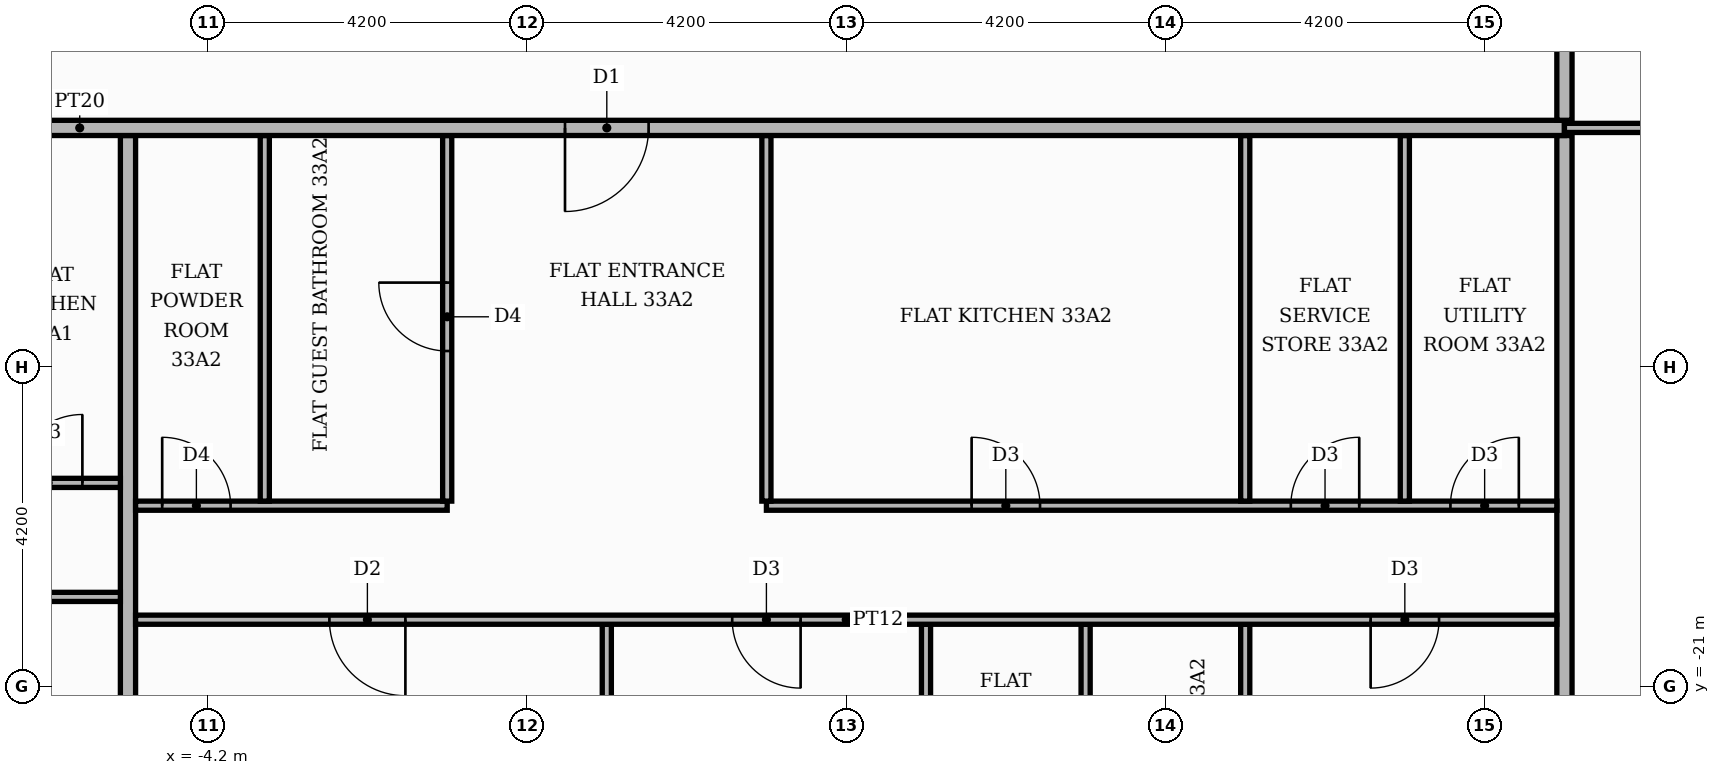
"""IFC4 building model, lengths in metres.
Left out: names, types, materials, properties, quantities, classifications, styles, units other than length and angle.
Written with IfcOpenShell. Run it as: python <this file> out.ifc"""

import sys

from ifc_helpers import new_model, si_unit, direction, frame, frame_2d, origin, place, context, subcontext, project, spatial, rectangle, extrude, element, fill, save


model = new_model("IFC4")
c1 = context("Model", 3, precision=1e-05, world=origin(), true_north=direction((0.0, 1.0)))
c2 = subcontext(c1, "Body", "Model", "MODEL_VIEW")
j1 = project(units=[si_unit("LENGTHUNIT", "METRE"), si_unit("PLANEANGLEUNIT", "RADIAN")], contexts=[c1])
p1 = place(None, origin())
s1 = spatial("IfcSite", under=j1, at=p1, CompositionType="ELEMENT")
p2 = place(p1, origin())
s2 = spatial("IfcBuilding", under=s1, at=p2, CompositionType="ELEMENT")
p3 = place(p2, frame((0.0, 0.0, 141.6)))
s3 = spatial("IfcBuildingStorey", under=s2, at=p3, CompositionType="ELEMENT", Elevation=141.6)
p4 = place(p3, frame((-5.25, -25.42, 0.0), z_axis=(0.0, 0.0, 1.0), x_axis=(0.0, 1.0, 0.0)))
e1 = element("IfcWall", 1, at=p4, inside=s3, PredefinedType="PARTITIONING", context=c2, shape_type="SweptSolid", body=[
    extrude(rectangle(XDim=11.67, YDim=0.2, at=frame_2d((5.835, 0.0))), origin(), (0.0, 0.0, 1.0), 3.48),
])
p5 = place(p3, frame((1.05, -25.42, 0.0), z_axis=(0.0, 0.0, 1.0), x_axis=(0.0, 1.0, 0.0)))
e2 = element("IfcWall", 2, at=p5, inside=s3, PredefinedType="PARTITIONING", context=c2, shape_type="SweptSolid", body=[
    extrude(rectangle(XDim=5.24, YDim=0.12, at=frame_2d((2.62, 0.0))), origin(), (0.0, 0.0, 1.0), 3.48),
])
p6 = place(p3, frame((5.25, -25.42, 0.0), z_axis=(0.0, 0.0, 1.0), x_axis=(0.0, 1.0, 0.0)))
e3 = element("IfcWall", 3, at=p6, inside=s3, PredefinedType="PARTITIONING", context=c2, shape_type="SweptSolid", body=[
    extrude(rectangle(XDim=5.24, YDim=0.12, at=frame_2d((2.62, 0.0))), origin(), (0.0, 0.0, 1.0), 3.48),
])
p7 = place(p6, frame((2.05, 0.0, 0.0)))
e4 = element("IfcOpeningElement", 4, at=p7, cuts=e3, PredefinedType="OPENING", context=c2, shape_type="SweptSolid", body=[
    extrude(rectangle(XDim=0.9, YDim=2.1, at=frame_2d((0.45, 1.05))), frame((0.0, 0.07, 0.0), z_axis=(0.0, -1.0, 0.0), x_axis=(1.0, 0.0, 0.0)), (0.0, 0.0, 1.0), 0.14),
])
p8 = place(p3, frame((7.35, -25.42, 0.0), z_axis=(0.0, 0.0, 1.0), x_axis=(0.0, 1.0, 0.0)))
e5 = element("IfcWall", 5, at=p8, inside=s3, PredefinedType="PARTITIONING", context=c2, shape_type="SweptSolid", body=[
    extrude(rectangle(XDim=5.24, YDim=0.12, at=frame_2d((2.62, 0.0))), origin(), (0.0, 0.0, 1.0), 3.48),
])
p9 = place(p8, frame((2.05, 0.0, 0.0)))
e6 = element("IfcOpeningElement", 6, at=p9, cuts=e5, PredefinedType="OPENING", context=c2, shape_type="SweptSolid", body=[
    extrude(rectangle(XDim=0.9, YDim=2.1, at=frame_2d((0.45, 1.05))), frame((0.0, 0.07, 0.0), z_axis=(0.0, -1.0, 0.0), x_axis=(1.0, 0.0, 0.0)), (0.0, 0.0, 1.0), 0.14),
])
p10 = place(p3, frame((9.45, -25.42, 0.0), z_axis=(0.0, 0.0, 1.0), x_axis=(0.0, 1.0, 0.0)))
e7 = element("IfcWall", 7, at=p10, inside=s3, PredefinedType="PARTITIONING", context=c2, shape_type="SweptSolid", body=[
    extrude(rectangle(XDim=5.24, YDim=0.12, at=frame_2d((2.62, 0.0))), origin(), (0.0, 0.0, 1.0), 3.48),
])
p11 = place(p3, frame((13.65, -25.42, 0.0), z_axis=(0.0, 0.0, 1.0), x_axis=(0.0, 1.0, 0.0)))
e8 = element("IfcWall", 8, at=p11, inside=s3, PredefinedType="PARTITIONING", context=c2, shape_type="SweptSolid", body=[
    extrude(rectangle(XDim=11.67, YDim=0.2, at=frame_2d((5.835, 0.0))), origin(), (0.0, 0.0, 1.0), 3.48),
])
p12 = place(p3, frame((-5.15, -20.12, 0.0), z_axis=(0.0, 0.0, 1.0), x_axis=(1.0, 0.0, 0.0)))
e9 = element("IfcWall", 9, at=p12, inside=s3, PredefinedType="PARTITIONING", context=c2, shape_type="SweptSolid", body=[
    extrude(rectangle(XDim=18.7, YDim=0.12, at=frame_2d((9.35, 0.0))), origin(), (0.0, 0.0, 1.0), 3.48),
])
p13 = place(p12, frame((2.55, 0.0, 0.0)))
e10 = element("IfcOpeningElement", 10, at=p13, cuts=e9, PredefinedType="OPENING", context=c2, shape_type="SweptSolid", body=[
    extrude(rectangle(XDim=1.0, YDim=2.1, at=frame_2d((0.5, 1.05))), frame((0.0, 0.07, 0.0), z_axis=(0.0, -1.0, 0.0), x_axis=(1.0, 0.0, 0.0)), (0.0, 0.0, 1.0), 0.14),
])
p14 = place(p12, frame((7.85, 0.0, 0.0)))
e11 = element("IfcOpeningElement", 11, at=p14, cuts=e9, PredefinedType="OPENING", context=c2, shape_type="SweptSolid", body=[
    extrude(rectangle(XDim=0.9, YDim=2.1, at=frame_2d((0.45, 1.05))), frame((0.0, 0.07, 0.0), z_axis=(0.0, -1.0, 0.0), x_axis=(1.0, 0.0, 0.0)), (0.0, 0.0, 1.0), 0.14),
])
p15 = place(p12, frame((16.25, 0.0, 0.0)))
e12 = element("IfcOpeningElement", 12, at=p15, cuts=e9, PredefinedType="OPENING", context=c2, shape_type="SweptSolid", body=[
    extrude(rectangle(XDim=0.9, YDim=2.1, at=frame_2d((0.45, 1.05))), frame((0.0, 0.07, 0.0), z_axis=(0.0, -1.0, 0.0), x_axis=(1.0, 0.0, 0.0)), (0.0, 0.0, 1.0), 0.14),
])
p16 = place(p3, frame((-17.5, -19.82, 0.0), z_axis=(0.0, 0.0, 1.0), x_axis=(1.0, 0.0, 0.0)))
e13 = element("IfcWall", 13, at=p16, inside=s3, PredefinedType="PARTITIONING", context=c2, shape_type="SweptSolid", body=[
    extrude(rectangle(XDim=12.15, YDim=0.12, at=frame_2d((6.075, 0.0))), origin(), (0.0, 0.0, 1.0), 3.48),
])
p17 = place(p16, frame((2.3, 0.0, 0.0)))
e14 = element("IfcOpeningElement", 14, at=p17, cuts=e13, PredefinedType="OPENING", context=c2, shape_type="SweptSolid", body=[
    extrude(rectangle(XDim=1.0, YDim=2.1, at=frame_2d((0.5, 1.05))), frame((0.0, 0.07, 0.0), z_axis=(0.0, -1.0, 0.0), x_axis=(1.0, 0.0, 0.0)), (0.0, 0.0, 1.0), 0.14),
])
p18 = place(p16, frame((5.5, 0.0, 0.0)))
e15 = element("IfcOpeningElement", 15, at=p18, cuts=e13, PredefinedType="OPENING", context=c2, shape_type="SweptSolid", body=[
    extrude(rectangle(XDim=0.9, YDim=2.1, at=frame_2d((0.45, 1.05))), frame((0.0, 0.07, 0.0), z_axis=(0.0, -1.0, 0.0), x_axis=(1.0, 0.0, 0.0)), (0.0, 0.0, 1.0), 0.14),
])
p19 = place(p3, frame((-5.15, -18.62, 0.0), z_axis=(0.0, 0.0, 1.0), x_axis=(1.0, 0.0, 0.0)))
e16 = element("IfcWall", 16, at=p19, inside=s3, PredefinedType="PARTITIONING", context=c2, shape_type="SweptSolid", body=[
    extrude(rectangle(XDim=4.1, YDim=0.12, at=frame_2d((2.05, 0.0))), origin(), (0.0, 0.0, 1.0), 3.48),
])
p20 = place(p19, frame((0.35, 0.0, 0.0)))
e17 = element("IfcOpeningElement", 17, at=p20, cuts=e16, PredefinedType="OPENING", context=c2, shape_type="SweptSolid", body=[
    extrude(rectangle(XDim=0.9, YDim=2.1, at=frame_2d((0.45, 1.05))), frame((0.0, 0.07, 0.0), z_axis=(0.0, -1.0, 0.0), x_axis=(1.0, 0.0, 0.0)), (0.0, 0.0, 1.0), 0.14),
])
p21 = place(p3, frame((3.15, -18.62, 0.0), z_axis=(0.0, 0.0, 1.0), x_axis=(1.0, 0.0, 0.0)))
e18 = element("IfcWall", 18, at=p21, inside=s3, PredefinedType="PARTITIONING", context=c2, shape_type="SweptSolid", body=[
    extrude(rectangle(XDim=10.4, YDim=0.12, at=frame_2d((5.2, 0.0))), origin(), (0.0, 0.0, 1.0), 3.48),
])
p22 = place(p21, frame((2.7, 0.0, 0.0)))
e19 = element("IfcOpeningElement", 19, at=p22, cuts=e18, PredefinedType="OPENING", context=c2, shape_type="SweptSolid", body=[
    extrude(rectangle(XDim=0.9, YDim=2.1, at=frame_2d((0.45, 1.05))), frame((0.0, 0.07, 0.0), z_axis=(0.0, -1.0, 0.0), x_axis=(1.0, 0.0, 0.0)), (0.0, 0.0, 1.0), 0.14),
])
p23 = place(p21, frame((6.9, 0.0, 0.0)))
e20 = element("IfcOpeningElement", 20, at=p23, cuts=e18, PredefinedType="OPENING", context=c2, shape_type="SweptSolid", body=[
    extrude(rectangle(XDim=0.9, YDim=2.1, at=frame_2d((0.45, 1.05))), frame((0.0, 0.07, 0.0), z_axis=(0.0, -1.0, 0.0), x_axis=(1.0, 0.0, 0.0)), (0.0, 0.0, 1.0), 0.14),
])
p24 = place(p21, frame((9.0, 0.0, 0.0)))
e21 = element("IfcOpeningElement", 21, at=p24, cuts=e18, PredefinedType="OPENING", context=c2, shape_type="SweptSolid", body=[
    extrude(rectangle(XDim=0.9, YDim=2.1, at=frame_2d((0.45, 1.05))), frame((0.0, 0.07, 0.0), z_axis=(0.0, -1.0, 0.0), x_axis=(1.0, 0.0, 0.0)), (0.0, 0.0, 1.0), 0.14),
])
p25 = place(p3, frame((-3.45, -18.56, 0.0), z_axis=(0.0, 0.0, 1.0), x_axis=(0.0, 1.0, 0.0)))
e22 = element("IfcWall", 22, at=p25, inside=s3, PredefinedType="PARTITIONING", context=c2, shape_type="SweptSolid", body=[
    extrude(rectangle(XDim=4.81, YDim=0.12, at=frame_2d((2.405, 0.0))), origin(), (0.0, 0.0, 1.0), 3.48),
])
p26 = place(p3, frame((-1.05, -18.56, 0.0), z_axis=(0.0, 0.0, 1.0), x_axis=(0.0, 1.0, 0.0)))
e23 = element("IfcWall", 23, at=p26, inside=s3, PredefinedType="PARTITIONING", context=c2, shape_type="SweptSolid", body=[
    extrude(rectangle(XDim=4.81, YDim=0.12, at=frame_2d((2.405, 0.0))), origin(), (0.0, 0.0, 1.0), 3.48),
])
p27 = place(p26, frame((1.975, 0.0, 0.0)))
e24 = element("IfcOpeningElement", 24, at=p27, cuts=e23, PredefinedType="OPENING", context=c2, shape_type="SweptSolid", body=[
    extrude(rectangle(XDim=0.9, YDim=2.1, at=frame_2d((0.45, 1.05))), frame((0.0, 0.07, 0.0), z_axis=(0.0, -1.0, 0.0), x_axis=(1.0, 0.0, 0.0)), (0.0, 0.0, 1.0), 0.14),
])
for number, where, z_axis, x_axis in (
    (25, (3.15, -18.56, 0.0), (0.0, 0.0, 1.0), (0.0, 1.0, 0.0)),
    (26, (9.45, -18.56, 0.0), (0.0, 0.0, 1.0), (0.0, 1.0, 0.0)),
    (27, (11.55, -18.56, 0.0), (0.0, 0.0, 1.0), (0.0, 1.0, 0.0)),
):
    element("IfcWall", number, at=place(p3, frame(where, z_axis=z_axis, x_axis=x_axis)), inside=s3, PredefinedType="PARTITIONING", context=c2, shape_type="SweptSolid", body=[
        extrude(rectangle(XDim=4.81, YDim=0.12, at=frame_2d((2.405, 0.0))), origin(), (0.0, 0.0, 1.0), 3.48),
    ])
p28 = place(p3, frame((-9.45, -18.32, 0.0), z_axis=(0.0, 0.0, 1.0), x_axis=(1.0, 0.0, 0.0)))
e28 = element("IfcWall", 28, at=p28, inside=s3, PredefinedType="PARTITIONING", context=c2, shape_type="SweptSolid", body=[
    extrude(rectangle(XDim=4.1, YDim=0.12, at=frame_2d((2.05, 0.0))), origin(), (0.0, 0.0, 1.0), 3.48),
])
p29 = place(p28, frame((2.7, 0.0, 0.0)))
e29 = element("IfcOpeningElement", 29, at=p29, cuts=e28, PredefinedType="OPENING", context=c2, shape_type="SweptSolid", body=[
    extrude(rectangle(XDim=0.9, YDim=2.1, at=frame_2d((0.45, 1.05))), frame((0.0, 0.07, 0.0), z_axis=(0.0, -1.0, 0.0), x_axis=(1.0, 0.0, 0.0)), (0.0, 0.0, 1.0), 0.14),
])
p30 = place(p3, frame((-25.42, -13.65, 0.0), z_axis=(0.0, 0.0, 1.0), x_axis=(1.0, 0.0, 0.0)))
e30 = element("IfcWall", 30, at=p30, inside=s3, PredefinedType="PARTITIONING", context=c2, shape_type="SweptSolid", body=[
    extrude(rectangle(XDim=39.07, YDim=0.2, at=frame_2d((19.535, 0.0))), origin(), (0.0, 0.0, 1.0), 3.48),
])
p31 = place(p30, frame((13.32, 0.0, 0.0)))
e31 = element("IfcOpeningElement", 31, at=p31, cuts=e30, PredefinedType="OPENING", context=c2, shape_type="SweptSolid", body=[
    extrude(rectangle(XDim=1.1, YDim=2.4, at=frame_2d((0.55, 1.2))), frame((0.0, 0.11, 0.0), z_axis=(0.0, -1.0, 0.0), x_axis=(1.0, 0.0, 0.0)), (0.0, 0.0, 1.0), 0.22),
])
p32 = place(p30, frame((25.92, 0.0, 0.0)))
e32 = element("IfcOpeningElement", 32, at=p32, cuts=e30, PredefinedType="OPENING", context=c2, shape_type="SweptSolid", body=[
    extrude(rectangle(XDim=1.1, YDim=2.4, at=frame_2d((0.55, 1.2))), frame((0.0, 0.11, 0.0), z_axis=(0.0, -1.0, 0.0), x_axis=(1.0, 0.0, 0.0)), (0.0, 0.0, 1.0), 0.22),
])
p33 = place(p3, frame((13.65, -13.65, 0.0), z_axis=(0.0, 0.0, 1.0), x_axis=(1.0, 0.0, 0.0)))
e33 = element("IfcWall", 33, at=p33, inside=s3, PredefinedType="PARTITIONING", context=c2, shape_type="SweptSolid", body=[
    extrude(rectangle(XDim=6.17, YDim=0.12, at=frame_2d((3.085, 0.0))), origin(), (0.0, 0.0, 1.0), 3.48),
])
p34 = place(p33, frame((2.635, 0.0, 0.0)))
e34 = element("IfcOpeningElement", 34, at=p34, cuts=e33, PredefinedType="OPENING", context=c2, shape_type="SweptSolid", body=[
    extrude(rectangle(XDim=0.9, YDim=2.1, at=frame_2d((0.45, 1.05))), frame((0.0, 0.07, 0.0), z_axis=(0.0, -1.0, 0.0), x_axis=(1.0, 0.0, 0.0)), (0.0, 0.0, 1.0), 0.14),
])
p35 = place(p3, frame((13.65, -13.55, 0.0), z_axis=(0.0, 0.0, 1.0), x_axis=(0.0, 1.0, 0.0)))
e35 = element("IfcWall", 35, at=p35, inside=s3, PredefinedType="PARTITIONING", context=c2, shape_type="SweptSolid", body=[
    extrude(rectangle(XDim=2.45, YDim=0.2, at=frame_2d((1.225, 0.0))), origin(), (0.0, 0.0, 1.0), 3.48),
])
p36 = place(p29, origin())
e36 = element("IfcDoor", 36, at=p36, inside=s3, OperationType="SINGLE_SWING_RIGHT", PredefinedType="DOOR", context=c2, shape_type="SweptSolid", body=[
    extrude(rectangle(XDim=0.9, YDim=2.1, at=frame_2d((0.45, 1.05))), frame((0.0, 0.025, 0.0), z_axis=(0.0, -1.0, 0.0), x_axis=(1.0, 0.0, 0.0)), (0.0, 0.0, 1.0), 0.05),
])
fill(e29, e36)
p37 = place(p32, frame((1.1, 0.0, 0.0), z_axis=(0.0, 0.0, 1.0), x_axis=(-1.0, 0.0, 0.0)))
e37 = element("IfcDoor", 37, at=p37, inside=s3, OperationType="SINGLE_SWING_LEFT", PredefinedType="DOOR", context=c2, shape_type="SweptSolid", body=[
    extrude(rectangle(XDim=1.1, YDim=2.4, at=frame_2d((0.55, 1.2))), frame((0.0, 0.025, 0.0), z_axis=(0.0, -1.0, 0.0), x_axis=(1.0, 0.0, 0.0)), (0.0, 0.0, 1.0), 0.05),
])
fill(e32, e37)
p38 = place(p20, origin())
e38 = element("IfcDoor", 38, at=p38, inside=s3, OperationType="SINGLE_SWING_LEFT", PredefinedType="DOOR", context=c2, shape_type="SweptSolid", body=[
    extrude(rectangle(XDim=0.9, YDim=2.1, at=frame_2d((0.45, 1.05))), frame((0.0, 0.025, 0.0), z_axis=(0.0, -1.0, 0.0), x_axis=(1.0, 0.0, 0.0)), (0.0, 0.0, 1.0), 0.05),
])
fill(e17, e38)
p39 = place(p27, origin())
e39 = element("IfcDoor", 39, at=p39, inside=s3, OperationType="SINGLE_SWING_RIGHT", PredefinedType="DOOR", context=c2, shape_type="SweptSolid", body=[
    extrude(rectangle(XDim=0.9, YDim=2.1, at=frame_2d((0.45, 1.05))), frame((0.0, 0.025, 0.0), z_axis=(0.0, -1.0, 0.0), x_axis=(1.0, 0.0, 0.0)), (0.0, 0.0, 1.0), 0.05),
])
fill(e24, e39)
p40 = place(p22, origin())
e40 = element("IfcDoor", 40, at=p40, inside=s3, OperationType="SINGLE_SWING_LEFT", PredefinedType="DOOR", context=c2, shape_type="SweptSolid", body=[
    extrude(rectangle(XDim=0.9, YDim=2.1, at=frame_2d((0.45, 1.05))), frame((0.0, 0.025, 0.0), z_axis=(0.0, -1.0, 0.0), x_axis=(1.0, 0.0, 0.0)), (0.0, 0.0, 1.0), 0.05),
])
fill(e19, e40)
p41 = place(p23, origin())
e41 = element("IfcDoor", 41, at=p41, inside=s3, OperationType="SINGLE_SWING_RIGHT", PredefinedType="DOOR", context=c2, shape_type="SweptSolid", body=[
    extrude(rectangle(XDim=0.9, YDim=2.1, at=frame_2d((0.45, 1.05))), frame((0.0, 0.025, 0.0), z_axis=(0.0, -1.0, 0.0), x_axis=(1.0, 0.0, 0.0)), (0.0, 0.0, 1.0), 0.05),
])
fill(e20, e41)
p42 = place(p24, origin())
e42 = element("IfcDoor", 42, at=p42, inside=s3, OperationType="SINGLE_SWING_RIGHT", PredefinedType="DOOR", context=c2, shape_type="SweptSolid", body=[
    extrude(rectangle(XDim=0.9, YDim=2.1, at=frame_2d((0.45, 1.05))), frame((0.0, 0.025, 0.0), z_axis=(0.0, -1.0, 0.0), x_axis=(1.0, 0.0, 0.0)), (0.0, 0.0, 1.0), 0.05),
])
fill(e21, e42)
p43 = place(p13, frame((1.0, 0.0, 0.0), z_axis=(0.0, 0.0, 1.0), x_axis=(-1.0, 0.0, 0.0)))
e43 = element("IfcDoor", 43, at=p43, inside=s3, OperationType="SINGLE_SWING_RIGHT", PredefinedType="DOOR", context=c2, shape_type="SweptSolid", body=[
    extrude(rectangle(XDim=1.0, YDim=2.1, at=frame_2d((0.5, 1.05))), frame((0.0, 0.025, 0.0), z_axis=(0.0, -1.0, 0.0), x_axis=(1.0, 0.0, 0.0)), (0.0, 0.0, 1.0), 0.05),
])
fill(e10, e43)
p44 = place(p14, frame((0.9, 0.0, 0.0), z_axis=(0.0, 0.0, 1.0), x_axis=(-1.0, 0.0, 0.0)))
e44 = element("IfcDoor", 44, at=p44, inside=s3, OperationType="SINGLE_SWING_RIGHT", PredefinedType="DOOR", context=c2, shape_type="SweptSolid", body=[
    extrude(rectangle(XDim=0.9, YDim=2.1, at=frame_2d((0.45, 1.05))), frame((0.0, 0.025, 0.0), z_axis=(0.0, -1.0, 0.0), x_axis=(1.0, 0.0, 0.0)), (0.0, 0.0, 1.0), 0.05),
])
fill(e11, e44)
p45 = place(p15, frame((0.9, 0.0, 0.0), z_axis=(0.0, 0.0, 1.0), x_axis=(-1.0, 0.0, 0.0)))
e45 = element("IfcDoor", 45, at=p45, inside=s3, OperationType="SINGLE_SWING_LEFT", PredefinedType="DOOR", context=c2, shape_type="SweptSolid", body=[
    extrude(rectangle(XDim=0.9, YDim=2.1, at=frame_2d((0.45, 1.05))), frame((0.0, 0.025, 0.0), z_axis=(0.0, -1.0, 0.0), x_axis=(1.0, 0.0, 0.0)), (0.0, 0.0, 1.0), 0.05),
])
fill(e12, e45)
save(model, sys.argv[1])
